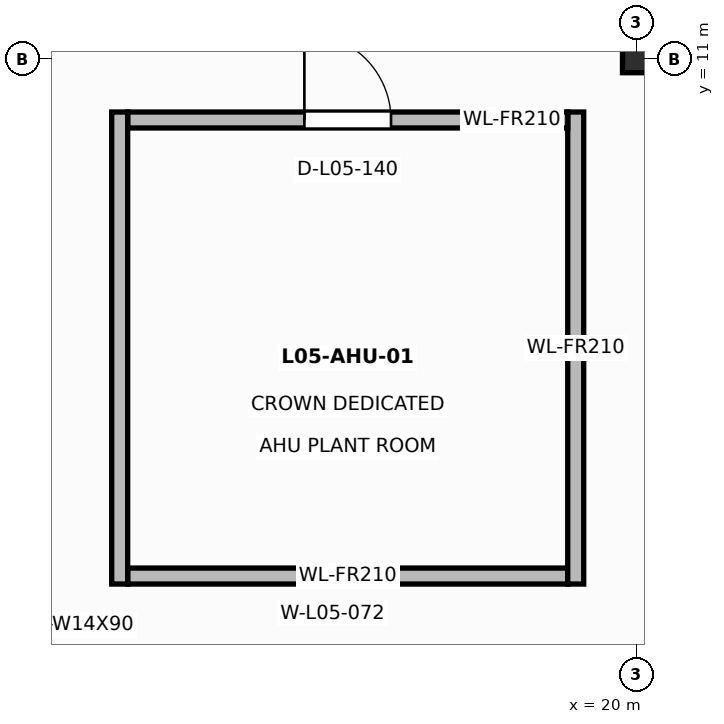
"""IFC4 building model, lengths in metres.
Left out: names, types, materials, properties, quantities, classifications, styles, units other than length and angle.
Written with IfcOpenShell. Run it as: python <this file> out.ifc"""

import sys

from ifc_helpers import new_model, si_unit, direction, frame, frame_2d, origin, origin_2d, place, context, subcontext, project, spatial, rectangle, i_section, extrude, element, fill, save


model = new_model("IFC4")
c1 = context("Model", 3, precision=1e-05, world=origin(), true_north=direction((0.0, 1.0)))
c2 = subcontext(c1, "Body", "Model", "MODEL_VIEW")
j1 = project(units=[si_unit("LENGTHUNIT", "METRE"), si_unit("PLANEANGLEUNIT", "RADIAN")], contexts=[c1])
p1 = place(None, origin())
s1 = spatial("IfcSite", under=j1, at=p1, CompositionType="ELEMENT")
p2 = place(p1, origin())
s2 = spatial("IfcBuilding", under=s1, at=p2, CompositionType="ELEMENT")
p3 = place(p2, frame((0.0, 0.0, 24.0)))
s3 = spatial("IfcBuildingStorey", under=s2, at=p3, CompositionType="ELEMENT", Elevation=24.0)
p4 = place(p3, frame((20.0, 11.0, 0.0), z_axis=(0.0, 0.0, 1.0), x_axis=(1.0, 0.0, 0.0)))
e1 = element("IfcColumn", 1, at=p4, inside=s3, PredefinedType="COLUMN", context=c2, shape_type="SweptSolid", body=[
    extrude(i_section(OverallWidth=0.369, OverallDepth=0.356, WebThickness=0.011, FlangeThickness=0.018, at=origin_2d()), origin(), (0.0, 0.0, 1.0), 4.0),
])
p5 = place(p3, frame((13.305, 4.2, 0.0), z_axis=(0.0, 0.0, 1.0), x_axis=(1.0, 0.0, 0.0)))
e2 = element("IfcWall", 2, at=p5, inside=s3, PredefinedType="SOLIDWALL", context=c2, shape_type="SweptSolid", body=[
    extrude(rectangle(XDim=5.79, YDim=0.21, at=frame_2d((2.895, 0.0))), origin(), (0.0, 0.0, 1.0), 3.6),
])
p6 = place(p3, frame((19.2, 4.095, 0.0), z_axis=(0.0, 0.0, 1.0), x_axis=(0.0, 1.0, 0.0)))
e3 = element("IfcWall", 3, at=p6, inside=s3, PredefinedType="SOLIDWALL", context=c2, shape_type="SweptSolid", body=[
    extrude(rectangle(XDim=6.21, YDim=0.21, at=frame_2d((3.105, 0.0))), origin(), (0.0, 0.0, 1.0), 3.6),
])
p7 = place(p3, frame((19.095, 10.2, 0.0), z_axis=(0.0, 0.0, 1.0), x_axis=(-1.0, 0.0, 0.0)))
e4 = element("IfcWall", 4, at=p7, inside=s3, PredefinedType="SOLIDWALL", context=c2, shape_type="SweptSolid", body=[
    extrude(rectangle(XDim=5.79, YDim=0.21, at=frame_2d((2.895, 0.0))), origin(), (0.0, 0.0, 1.0), 3.6),
])
p8 = place(p7, frame((2.325, 0.0, 0.0)))
e5 = element("IfcOpeningElement", 5, at=p8, cuts=e4, PredefinedType="OPENING", context=c2, shape_type="SweptSolid", body=[
    extrude(rectangle(XDim=1.14, YDim=2.18, at=frame_2d((0.57, 1.09))), frame((0.0, 0.115, 0.0), z_axis=(0.0, -1.0, 0.0), x_axis=(1.0, 0.0, 0.0)), (0.0, 0.0, 1.0), 0.23),
])
p9 = place(p3, frame((13.2, 10.305, 0.0), z_axis=(0.0, 0.0, 1.0), x_axis=(0.0, -1.0, 0.0)))
e6 = element("IfcWall", 6, at=p9, inside=s3, PredefinedType="SOLIDWALL", context=c2, shape_type="SweptSolid", body=[
    extrude(rectangle(XDim=6.21, YDim=0.21, at=frame_2d((3.105, 0.0))), origin(), (0.0, 0.0, 1.0), 3.6),
])
p10 = place(p8, frame((1.14, 0.0, 0.0), z_axis=(0.0, 0.0, 1.0), x_axis=(-1.0, 0.0, 0.0)))
e7 = element("IfcDoor", 7, at=p10, inside=s3, OperationType="SINGLE_SWING_RIGHT", PredefinedType="DOOR", context=c2, shape_type="SweptSolid", body=[
    extrude(rectangle(XDim=1.14, YDim=2.18, at=frame_2d((0.57, 1.09))), frame((0.0, 0.025, 0.0), z_axis=(0.0, -1.0, 0.0), x_axis=(1.0, 0.0, 0.0)), (0.0, 0.0, 1.0), 0.05),
])
fill(e5, e7)
save(model, sys.argv[1])
